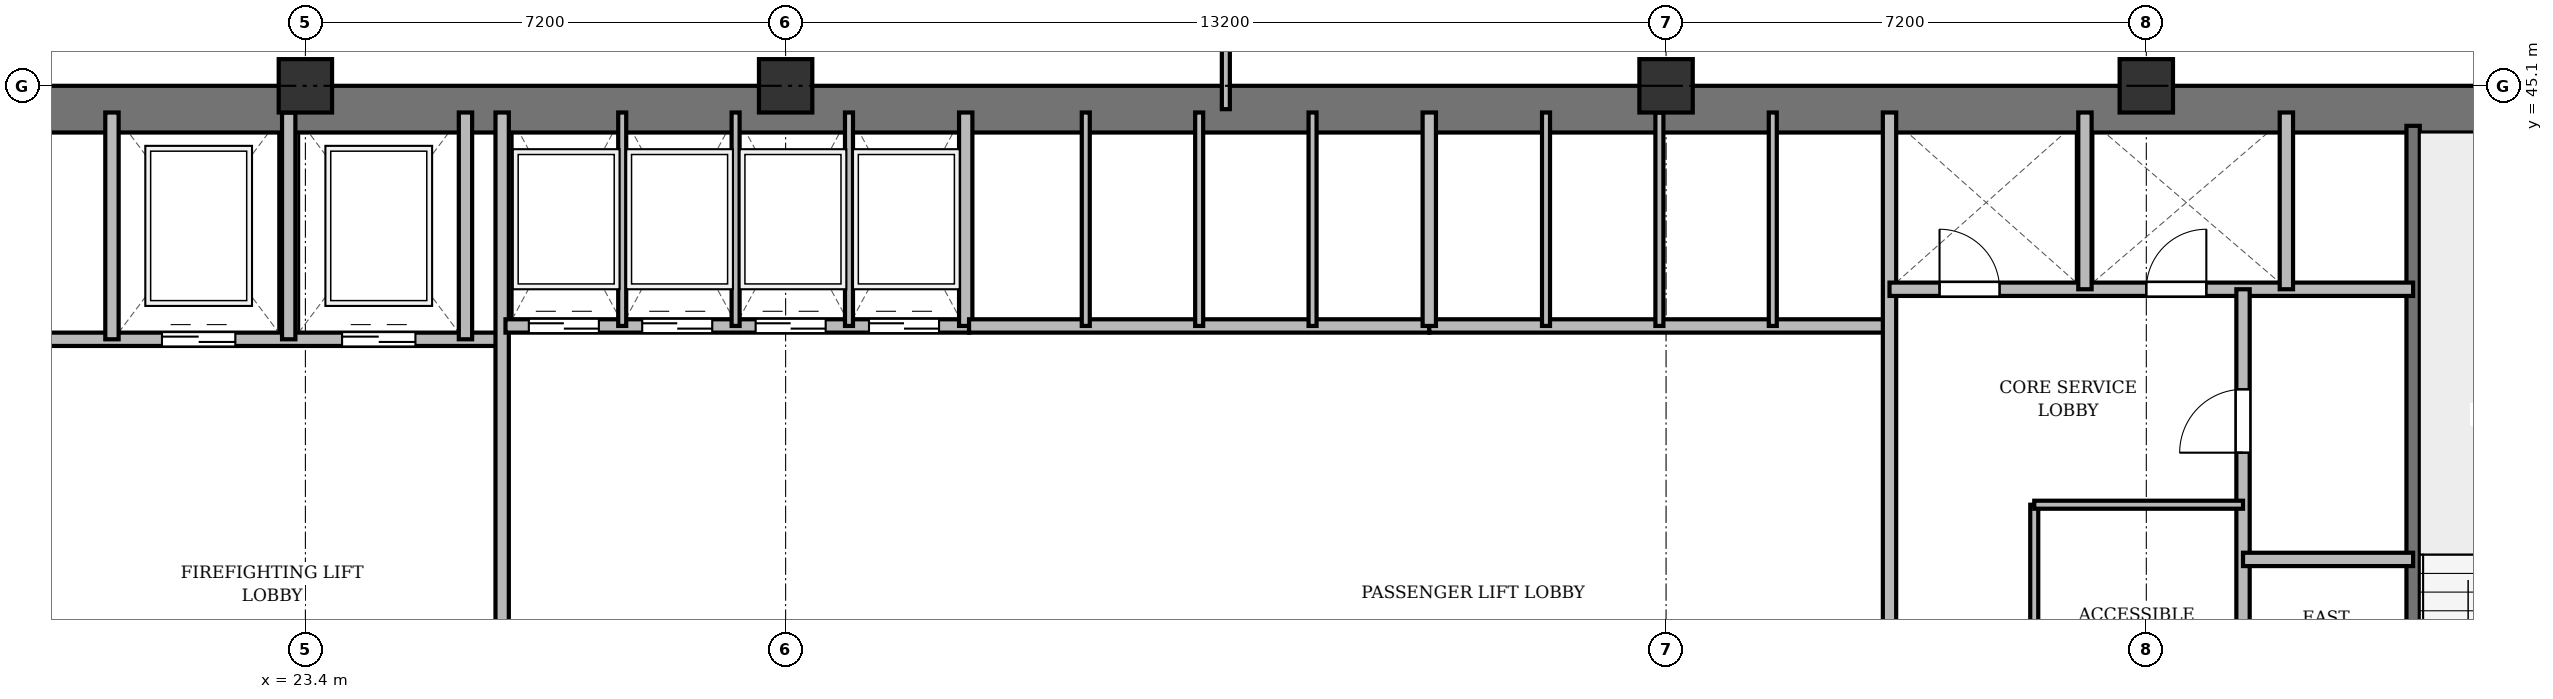
"""IFC4 building model, lengths in metres.
Left out: names, types, materials, properties, quantities, classifications, styles, units other than length and angle.
Written with IfcOpenShell. Run it as: python <this file> out.ifc"""

import sys

from ifc_helpers import new_model, si_unit, direction, frame, frame_2d, origin, origin_2d, place, context, subcontext, project, spatial, rectangle, extrude, source, transform, mapped, element, fill, save


model = new_model("IFC4")
c1 = context("Model", 3, precision=1e-05, world=origin(), true_north=direction((0.0, 1.0)))
c2 = subcontext(c1, "Body", "Model", "MODEL_VIEW")
j1 = project(units=[si_unit("LENGTHUNIT", "METRE"), si_unit("PLANEANGLEUNIT", "RADIAN")], contexts=[c1])
p1 = place(None, origin())
s1 = spatial("IfcSite", under=j1, at=p1, CompositionType="ELEMENT")
p2 = place(p1, origin())
s2 = spatial("IfcBuilding", under=s1, at=p2, CompositionType="ELEMENT")
p3 = place(p2, frame((0.0, 0.0, 88.9)))
s3 = spatial("IfcBuildingStorey", under=s2, at=p3, CompositionType="ELEMENT", Elevation=88.9)
m1 = source(origin(), c2, "Body", "SweptSolid", [
    extrude(rectangle(XDim=0.8, YDim=0.8, at=origin_2d()), origin(), (0.0, 0.0, 1.0), 3.6),
])
for number, where, z_axis, x_axis in (
    (1, (23.4, 45.1, 0.0), (0.0, 0.0, 1.0), (1.0, 0.0, 0.0)),
    (2, (30.6, 45.1, 0.0), (0.0, 0.0, 1.0), (1.0, 0.0, 0.0)),
    (3, (43.8, 45.1, 0.0), (0.0, 0.0, 1.0), (1.0, 0.0, 0.0)),
    (4, (51.0, 45.1, 0.0), (0.0, 0.0, 1.0), (1.0, 0.0, 0.0)),
):
    element("IfcColumn", number, at=place(p3, frame(where, z_axis=z_axis, x_axis=x_axis)), inside=s3, PredefinedType="COLUMN", context=c2, shape_type="MappedRepresentation", body=[
        mapped(m1, transform((0.0, 0.0, 0.0), x_axis=(1.0, 0.0, 0.0), y_axis=(0.0, 1.0, 0.0), z_axis=(0.0, 0.0, 1.0), scale=1.0)),
    ])
p4 = place(p3, frame((15.5, 44.75, 0.0), z_axis=(0.0, 0.0, 1.0), x_axis=(1.0, 0.0, 0.0)))
e5 = element("IfcWall", 5, at=p4, inside=s3, PredefinedType="SHEAR", context=c2, shape_type="SweptSolid", body=[
    extrude(rectangle(XDim=43.4, YDim=0.7, at=frame_2d((21.7, 0.0))), origin(), (0.0, 0.0, 1.0), 3.34),
])
p5 = place(p3, frame((55.0, 33.4, 0.0), z_axis=(0.0, 0.0, 1.0), x_axis=(0.0, 1.0, 0.0)))
e6 = element("IfcWall", 6, at=p5, inside=s3, PredefinedType="SHEAR", context=c2, shape_type="SweptSolid", body=[
    extrude(rectangle(XDim=11.1, YDim=0.2, at=frame_2d((5.55, 0.0))), origin(), (0.0, 0.0, 1.0), 3.34),
])
p6 = place(p5, frame((0.85, 0.0, 0.0)))
e7 = element("IfcOpeningElement", 7, at=p6, cuts=e6, PredefinedType="OPENING", context=c2, shape_type="SweptSolid", body=[
    extrude(rectangle(XDim=1.1, YDim=2.15, at=frame_2d((0.55, 1.075))), frame((0.0, 0.11, 0.0), z_axis=(0.0, -1.0, 0.0), x_axis=(1.0, 0.0, 0.0)), (0.0, 0.0, 1.0), 0.22),
])
p7 = place(p3, frame((19.55, 41.3, 0.0), z_axis=(0.0, 0.0, 1.0), x_axis=(1.0, 0.0, 0.0)))
e8 = element("IfcWall", 8, at=p7, inside=s3, PredefinedType="SOLIDWALL", context=c2, shape_type="SweptSolid", body=[
    extrude(rectangle(XDim=6.75, YDim=0.2, at=frame_2d((3.375, 0.0))), origin(), (0.0, 0.0, 1.0), 3.34),
])
p8 = place(p7, frame((1.7, 0.0, 0.0)))
e9 = element("IfcOpeningElement", 9, at=p8, cuts=e8, PredefinedType="OPENING", context=c2, shape_type="SweptSolid", body=[
    extrude(rectangle(XDim=1.1, YDim=2.15, at=frame_2d((0.55, 1.075))), frame((0.0, 0.11, 0.0), z_axis=(0.0, -1.0, 0.0), x_axis=(1.0, 0.0, 0.0)), (0.0, 0.0, 1.0), 0.22),
])
p9 = place(p7, frame((4.4, 0.0, 0.0)))
e10 = element("IfcOpeningElement", 10, at=p9, cuts=e8, PredefinedType="OPENING", context=c2, shape_type="SweptSolid", body=[
    extrude(rectangle(XDim=1.1, YDim=2.15, at=frame_2d((0.55, 1.075))), frame((0.0, 0.11, 0.0), z_axis=(0.0, -1.0, 0.0), x_axis=(1.0, 0.0, 0.0)), (0.0, 0.0, 1.0), 0.22),
])
for number, where, z_axis, x_axis in (
    (11, (20.5, 41.3, 0.0), (0.0, 0.0, 1.0), (0.0, 1.0, 0.0)),
    (12, (23.15, 41.3, 0.0), (0.0, 0.0, 1.0), (0.0, 1.0, 0.0)),
    (13, (25.8, 41.3, 0.0), (0.0, 0.0, 1.0), (0.0, 1.0, 0.0)),
):
    element("IfcWall", number, at=place(p3, frame(where, z_axis=z_axis, x_axis=x_axis)), inside=s3, PredefinedType="SOLIDWALL", context=c2, shape_type="SweptSolid", body=[
        extrude(rectangle(XDim=3.4, YDim=0.2, at=frame_2d((1.7, 0.0))), origin(), (0.0, 0.0, 1.0), 3.34),
    ])
p10 = place(p3, frame((26.35, 33.4, 0.0), z_axis=(0.0, 0.0, 1.0), x_axis=(0.0, 1.0, 0.0)))
e14 = element("IfcWall", 14, at=p10, inside=s3, PredefinedType="SOLIDWALL", context=c2, shape_type="SweptSolid", body=[
    extrude(rectangle(XDim=11.3, YDim=0.2, at=frame_2d((5.65, 0.0))), origin(), (0.0, 0.0, 1.0), 2.752),
])
p11 = place(p3, frame((26.4, 41.5, 0.0), z_axis=(0.0, 0.0, 1.0), x_axis=(1.0, 0.0, 0.0)))
e15 = element("IfcWall", 15, at=p11, inside=s3, PredefinedType="SOLIDWALL", context=c2, shape_type="SweptSolid", body=[
    extrude(rectangle(XDim=6.95, YDim=0.2, at=frame_2d((3.475, 0.0))), origin(), (0.0, 0.0, 1.0), 3.34),
])
p12 = place(p11, frame((0.35, 0.0, 0.0)))
e16 = element("IfcOpeningElement", 16, at=p12, cuts=e15, PredefinedType="OPENING", context=c2, shape_type="SweptSolid", body=[
    extrude(rectangle(XDim=1.05, YDim=2.15, at=frame_2d((0.525, 1.075))), frame((0.0, 0.11, 0.0), z_axis=(0.0, -1.0, 0.0), x_axis=(1.0, 0.0, 0.0)), (0.0, 0.0, 1.0), 0.22),
])
p13 = place(p11, frame((2.05, 0.0, 0.0)))
e17 = element("IfcOpeningElement", 17, at=p13, cuts=e15, PredefinedType="OPENING", context=c2, shape_type="SweptSolid", body=[
    extrude(rectangle(XDim=1.05, YDim=2.15, at=frame_2d((0.525, 1.075))), frame((0.0, 0.11, 0.0), z_axis=(0.0, -1.0, 0.0), x_axis=(1.0, 0.0, 0.0)), (0.0, 0.0, 1.0), 0.22),
])
p14 = place(p11, frame((3.75, 0.0, 0.0)))
e18 = element("IfcOpeningElement", 18, at=p14, cuts=e15, PredefinedType="OPENING", context=c2, shape_type="SweptSolid", body=[
    extrude(rectangle(XDim=1.05, YDim=2.15, at=frame_2d((0.525, 1.075))), frame((0.0, 0.11, 0.0), z_axis=(0.0, -1.0, 0.0), x_axis=(1.0, 0.0, 0.0)), (0.0, 0.0, 1.0), 0.22),
])
p15 = place(p11, frame((5.45, 0.0, 0.0)))
e19 = element("IfcOpeningElement", 19, at=p15, cuts=e15, PredefinedType="OPENING", context=c2, shape_type="SweptSolid", body=[
    extrude(rectangle(XDim=1.05, YDim=2.15, at=frame_2d((0.525, 1.075))), frame((0.0, 0.11, 0.0), z_axis=(0.0, -1.0, 0.0), x_axis=(1.0, 0.0, 0.0)), (0.0, 0.0, 1.0), 0.22),
])
p16 = place(p3, frame((33.3, 41.5, 0.0), z_axis=(0.0, 0.0, 1.0), x_axis=(0.0, 1.0, 0.0)))
e20 = element("IfcWall", 20, at=p16, inside=s3, PredefinedType="SOLIDWALL", context=c2, shape_type="SweptSolid", body=[
    extrude(rectangle(XDim=3.2, YDim=0.2, at=frame_2d((1.6, 0.0))), origin(), (0.0, 0.0, 1.0), 3.34),
])
for number, where, z_axis, x_axis in (
    (21, (28.15, 41.5, 0.0), (0.0, 0.0, 1.0), (0.0, 1.0, 0.0)),
    (22, (29.85, 41.5, 0.0), (0.0, 0.0, 1.0), (0.0, 1.0, 0.0)),
    (23, (31.55, 41.5, 0.0), (0.0, 0.0, 1.0), (0.0, 1.0, 0.0)),
):
    element("IfcWall", number, at=place(p3, frame(where, z_axis=z_axis, x_axis=x_axis)), inside=s3, PredefinedType="PARTITIONING", context=c2, shape_type="SweptSolid", body=[
        extrude(rectangle(XDim=3.2, YDim=0.12, at=frame_2d((1.6, 0.0))), origin(), (0.0, 0.0, 1.0), 3.34),
    ])
p17 = place(p3, frame((33.35, 41.5, 0.0), z_axis=(0.0, 0.0, 1.0), x_axis=(1.0, 0.0, 0.0)))
e24 = element("IfcWall", 24, at=p17, inside=s3, PredefinedType="SOLIDWALL", context=c2, shape_type="SweptSolid", body=[
    extrude(rectangle(XDim=6.9, YDim=0.2, at=frame_2d((3.45, 0.0))), origin(), (0.0, 0.0, 1.0), 3.34),
])
for number, where, z_axis, x_axis in (
    (25, (35.1, 41.5, 0.0), (0.0, 0.0, 1.0), (0.0, 1.0, 0.0)),
    (26, (36.8, 41.5, 0.0), (0.0, 0.0, 1.0), (0.0, 1.0, 0.0)),
    (27, (38.5, 41.5, 0.0), (0.0, 0.0, 1.0), (0.0, 1.0, 0.0)),
):
    element("IfcWall", number, at=place(p3, frame(where, z_axis=z_axis, x_axis=x_axis)), inside=s3, PredefinedType="PARTITIONING", context=c2, shape_type="SweptSolid", body=[
        extrude(rectangle(XDim=3.2, YDim=0.12, at=frame_2d((1.6, 0.0))), origin(), (0.0, 0.0, 1.0), 3.34),
    ])
p18 = place(p3, frame((40.25, 41.5, 0.0), z_axis=(0.0, 0.0, 1.0), x_axis=(1.0, 0.0, 0.0)))
e28 = element("IfcWall", 28, at=p18, inside=s3, PredefinedType="SOLIDWALL", context=c2, shape_type="SweptSolid", body=[
    extrude(rectangle(XDim=6.9, YDim=0.2, at=frame_2d((3.45, 0.0))), origin(), (0.0, 0.0, 1.0), 2.84),
])
p19 = place(p3, frame((40.25, 41.5, 0.0), z_axis=(0.0, 0.0, 1.0), x_axis=(0.0, 1.0, 0.0)))
e29 = element("IfcWall", 29, at=p19, inside=s3, PredefinedType="SOLIDWALL", context=c2, shape_type="SweptSolid", body=[
    extrude(rectangle(XDim=3.2, YDim=0.2, at=frame_2d((1.6, 0.0))), origin(), (0.0, 0.0, 1.0), 3.34),
])
p20 = place(p3, frame((42.0, 41.5, 0.0), z_axis=(0.0, 0.0, 1.0), x_axis=(0.0, 1.0, 0.0)))
e30 = element("IfcWall", 30, at=p20, inside=s3, PredefinedType="PARTITIONING", context=c2, shape_type="SweptSolid", body=[
    extrude(rectangle(XDim=3.2, YDim=0.12, at=frame_2d((1.6, 0.0))), origin(), (0.0, 0.0, 1.0), 3.34),
])
p21 = place(p3, frame((43.7, 41.5, 0.0), z_axis=(0.0, 0.0, 1.0), x_axis=(0.0, 1.0, 0.0)))
e31 = element("IfcWall", 31, at=p21, inside=s3, PredefinedType="PARTITIONING", context=c2, shape_type="SweptSolid", body=[
    extrude(rectangle(XDim=3.2, YDim=0.12, at=frame_2d((1.6, 0.0))), origin(), (0.0, 0.0, 1.0), 2.84),
])
p22 = place(p3, frame((45.4, 41.5, 0.0), z_axis=(0.0, 0.0, 1.0), x_axis=(0.0, 1.0, 0.0)))
e32 = element("IfcWall", 32, at=p22, inside=s3, PredefinedType="PARTITIONING", context=c2, shape_type="SweptSolid", body=[
    extrude(rectangle(XDim=3.2, YDim=0.12, at=frame_2d((1.6, 0.0))), origin(), (0.0, 0.0, 1.0), 3.34),
])
p23 = place(p3, frame((47.15, 33.4, 0.0), z_axis=(0.0, 0.0, 1.0), x_axis=(0.0, 1.0, 0.0)))
e33 = element("IfcWall", 33, at=p23, inside=s3, PredefinedType="SOLIDWALL", context=c2, shape_type="SweptSolid", body=[
    extrude(rectangle(XDim=11.3, YDim=0.2, at=frame_2d((5.65, 0.0))), origin(), (0.0, 0.0, 1.0), 2.752),
])
p24 = place(p3, frame((47.15, 42.05, 0.0), z_axis=(0.0, 0.0, 1.0), x_axis=(1.0, 0.0, 0.0)))
e34 = element("IfcWall", 34, at=p24, inside=s3, PredefinedType="SOLIDWALL", context=c2, shape_type="SweptSolid", body=[
    extrude(rectangle(XDim=7.85, YDim=0.2, at=frame_2d((3.925, 0.0))), origin(), (0.0, 0.0, 1.0), 2.84),
])
p25 = place(p24, frame((0.75, 0.0, 0.0)))
e35 = element("IfcOpeningElement", 35, at=p25, cuts=e34, PredefinedType="OPENING", context=c2, shape_type="SweptSolid", body=[
    extrude(rectangle(XDim=0.9, YDim=2.1, at=frame_2d((0.45, 1.05))), frame((0.0, 0.11, 0.0), z_axis=(0.0, -1.0, 0.0), x_axis=(1.0, 0.0, 0.0)), (0.0, 0.0, 1.0), 0.22),
])
p26 = place(p24, frame((3.85, 0.0, 0.0)))
e36 = element("IfcOpeningElement", 36, at=p26, cuts=e34, PredefinedType="OPENING", context=c2, shape_type="SweptSolid", body=[
    extrude(rectangle(XDim=0.9, YDim=2.1, at=frame_2d((0.45, 1.05))), frame((0.0, 0.11, 0.0), z_axis=(0.0, -1.0, 0.0), x_axis=(1.0, 0.0, 0.0)), (0.0, 0.0, 1.0), 0.22),
])
for number, where, z_axis, x_axis in (
    (37, (50.08, 42.05, 0.0), (0.0, 0.0, 1.0), (0.0, 1.0, 0.0)),
    (38, (53.1, 42.05, 0.0), (0.0, 0.0, 1.0), (0.0, 1.0, 0.0)),
):
    element("IfcWall", number, at=place(p3, frame(where, z_axis=z_axis, x_axis=x_axis)), inside=s3, PredefinedType="SOLIDWALL", context=c2, shape_type="SweptSolid", body=[
        extrude(rectangle(XDim=2.65, YDim=0.2, at=frame_2d((1.325, 0.0))), origin(), (0.0, 0.0, 1.0), 3.34),
    ])
p27 = place(p3, frame((52.45, 33.4, 0.0), z_axis=(0.0, 0.0, 1.0), x_axis=(0.0, 1.0, 0.0)))
e39 = element("IfcWall", 39, at=p27, inside=s3, PredefinedType="PARTITIONING", context=c2, shape_type="SweptSolid", body=[
    extrude(rectangle(XDim=8.65, YDim=0.2, at=frame_2d((4.325, 0.0))), origin(), (0.0, 0.0, 1.0), 2.752),
])
p28 = place(p27, frame((6.2, 0.0, 0.0)))
e40 = element("IfcOpeningElement", 40, at=p28, cuts=e39, PredefinedType="OPENING", context=c2, shape_type="SweptSolid", body=[
    extrude(rectangle(XDim=0.95, YDim=2.15, at=frame_2d((0.475, 1.075))), frame((0.0, 0.11, 0.0), z_axis=(0.0, -1.0, 0.0), x_axis=(1.0, 0.0, 0.0)), (0.0, 0.0, 1.0), 0.22),
])
p29 = place(p3, frame((52.45, 38.0, 0.0), z_axis=(0.0, 0.0, 1.0), x_axis=(1.0, 0.0, 0.0)))
e41 = element("IfcWall", 41, at=p29, inside=s3, PredefinedType="PARTITIONING", context=c2, shape_type="SweptSolid", body=[
    extrude(rectangle(XDim=2.55, YDim=0.2, at=frame_2d((1.275, 0.0))), origin(), (0.0, 0.0, 1.0), 3.34),
])
p30 = place(p3, frame((49.32, 33.4, 0.0), z_axis=(0.0, 0.0, 1.0), x_axis=(0.0, 1.0, 0.0)))
e42 = element("IfcWall", 42, at=p30, inside=s3, PredefinedType="PARTITIONING", context=c2, shape_type="SweptSolid", body=[
    extrude(rectangle(XDim=5.42, YDim=0.12, at=frame_2d((2.71, 0.0))), origin(), (0.0, 0.0, 1.0), 2.752),
])
p31 = place(p30, frame((1.6, 0.0, 0.0)))
e43 = element("IfcOpeningElement", 43, at=p31, cuts=e42, PredefinedType="OPENING", context=c2, shape_type="SweptSolid", body=[
    extrude(rectangle(XDim=0.95, YDim=2.15, at=frame_2d((0.475, 1.075))), frame((0.0, 0.07, 0.0), z_axis=(0.0, -1.0, 0.0), x_axis=(1.0, 0.0, 0.0)), (0.0, 0.0, 1.0), 0.14),
])
p32 = place(p3, frame((49.32, 38.82, 0.0), z_axis=(0.0, 0.0, 1.0), x_axis=(1.0, 0.0, 0.0)))
e44 = element("IfcWall", 44, at=p32, inside=s3, PredefinedType="PARTITIONING", context=c2, shape_type="SweptSolid", body=[
    extrude(rectangle(XDim=3.13, YDim=0.12, at=frame_2d((1.565, 0.0))), origin(), (0.0, 0.0, 1.0), 2.84),
])
p33 = place(p3, frame((37.2, 44.75, 0.0), z_axis=(0.0, 0.0, 1.0), x_axis=(0.0, 1.0, 0.0)))
e45 = element("IfcWall", 45, at=p33, inside=s3, PredefinedType="PARTITIONING", context=c2, shape_type="SweptSolid", body=[
    extrude(rectangle(XDim=3.61, YDim=0.12, at=frame_2d((1.805, 0.0))), origin(), (0.0, 0.0, 1.0), 2.752),
])
p34 = place(p33, frame((1.1, 0.0, 0.0)))
e46 = element("IfcOpeningElement", 46, at=p34, cuts=e45, PredefinedType="OPENING", context=c2, shape_type="SweptSolid", body=[
    extrude(rectangle(XDim=0.95, YDim=2.15, at=frame_2d((0.475, 1.075))), frame((0.0, 0.07, 0.0), z_axis=(0.0, -1.0, 0.0), x_axis=(1.0, 0.0, 0.0)), (0.0, 0.0, 1.0), 0.14),
])
m2 = source(origin(), c2, "Body", "SweptSolid", [
    extrude(rectangle(XDim=1.1, YDim=2.15, at=frame_2d((0.55, 1.075))), frame((0.0, 0.025, 0.0), z_axis=(0.0, -1.0, 0.0), x_axis=(1.0, 0.0, 0.0)), (0.0, 0.0, 1.0), 0.05),
])
p35 = place(p8, origin())
e47 = element("IfcDoor", 47, at=p35, inside=s3, OperationType="DOUBLE_DOOR_SLIDING", PredefinedType="DOOR", context=c2, shape_type="MappedRepresentation", body=[
    mapped(m2, transform((0.0, 0.0, 0.0), x_axis=(1.0, 0.0, 0.0), y_axis=(0.0, 1.0, 0.0), z_axis=(0.0, 0.0, 1.0), scale=1.0)),
])
fill(e9, e47)
p36 = place(p9, origin())
e48 = element("IfcDoor", 48, at=p36, inside=s3, OperationType="DOUBLE_DOOR_SLIDING", PredefinedType="DOOR", context=c2, shape_type="MappedRepresentation", body=[
    mapped(m2, transform((0.0, 0.0, 0.0), x_axis=(1.0, 0.0, 0.0), y_axis=(0.0, 1.0, 0.0), z_axis=(0.0, 0.0, 1.0), scale=1.0)),
])
fill(e10, e48)
m3 = source(origin(), c2, "Body", "SweptSolid", [
    extrude(rectangle(XDim=1.05, YDim=2.15, at=frame_2d((0.525, 1.075))), frame((0.0, 0.025, 0.0), z_axis=(0.0, -1.0, 0.0), x_axis=(1.0, 0.0, 0.0)), (0.0, 0.0, 1.0), 0.05),
])
p37 = place(p12, origin())
e49 = element("IfcDoor", 49, at=p37, inside=s3, OperationType="DOUBLE_DOOR_SLIDING", PredefinedType="DOOR", context=c2, shape_type="MappedRepresentation", body=[
    mapped(m3, transform((0.0, 0.0, 0.0), x_axis=(1.0, 0.0, 0.0), y_axis=(0.0, 1.0, 0.0), z_axis=(0.0, 0.0, 1.0), scale=1.0)),
])
fill(e16, e49)
p38 = place(p13, origin())
e50 = element("IfcDoor", 50, at=p38, inside=s3, OperationType="DOUBLE_DOOR_SLIDING", PredefinedType="DOOR", context=c2, shape_type="MappedRepresentation", body=[
    mapped(m3, transform((0.0, 0.0, 0.0), x_axis=(1.0, 0.0, 0.0), y_axis=(0.0, 1.0, 0.0), z_axis=(0.0, 0.0, 1.0), scale=1.0)),
])
fill(e17, e50)
p39 = place(p14, origin())
e51 = element("IfcDoor", 51, at=p39, inside=s3, OperationType="DOUBLE_DOOR_SLIDING", PredefinedType="DOOR", context=c2, shape_type="MappedRepresentation", body=[
    mapped(m3, transform((0.0, 0.0, 0.0), x_axis=(1.0, 0.0, 0.0), y_axis=(0.0, 1.0, 0.0), z_axis=(0.0, 0.0, 1.0), scale=1.0)),
])
fill(e18, e51)
p40 = place(p15, origin())
e52 = element("IfcDoor", 52, at=p40, inside=s3, OperationType="DOUBLE_DOOR_SLIDING", PredefinedType="DOOR", context=c2, shape_type="MappedRepresentation", body=[
    mapped(m3, transform((0.0, 0.0, 0.0), x_axis=(1.0, 0.0, 0.0), y_axis=(0.0, 1.0, 0.0), z_axis=(0.0, 0.0, 1.0), scale=1.0)),
])
fill(e19, e52)
m4 = source(origin(), c2, "Body", "SweptSolid", [
    extrude(rectangle(XDim=0.9, YDim=2.1, at=frame_2d((0.45, 1.05))), frame((0.0, 0.025, 0.0), z_axis=(0.0, -1.0, 0.0), x_axis=(1.0, 0.0, 0.0)), (0.0, 0.0, 1.0), 0.05),
])
p41 = place(p25, origin())
e53 = element("IfcDoor", 53, at=p41, inside=s3, OperationType="SINGLE_SWING_LEFT", PredefinedType="DOOR", context=c2, shape_type="MappedRepresentation", body=[
    mapped(m4, transform((0.0, 0.0, 0.0), x_axis=(1.0, 0.0, 0.0), y_axis=(0.0, 1.0, 0.0), z_axis=(0.0, 0.0, 1.0), scale=1.0)),
])
fill(e35, e53)
p42 = place(p26, origin())
e54 = element("IfcDoor", 54, at=p42, inside=s3, OperationType="SINGLE_SWING_RIGHT", PredefinedType="DOOR", context=c2, shape_type="MappedRepresentation", body=[
    mapped(m4, transform((0.0, 0.0, 0.0), x_axis=(1.0, 0.0, 0.0), y_axis=(0.0, 1.0, 0.0), z_axis=(0.0, 0.0, 1.0), scale=1.0)),
])
fill(e36, e54)
m5 = source(origin(), c2, "Body", "SweptSolid", [
    extrude(rectangle(XDim=0.95, YDim=2.15, at=frame_2d((0.475, 1.075))), frame((0.0, 0.025, 0.0), z_axis=(0.0, -1.0, 0.0), x_axis=(1.0, 0.0, 0.0)), (0.0, 0.0, 1.0), 0.05),
])
p43 = place(p28, origin())
e55 = element("IfcDoor", 55, at=p43, inside=s3, OperationType="SINGLE_SWING_LEFT", PredefinedType="DOOR", context=c2, shape_type="MappedRepresentation", body=[
    mapped(m5, transform((0.0, 0.0, 0.0), x_axis=(1.0, 0.0, 0.0), y_axis=(0.0, 1.0, 0.0), z_axis=(0.0, 0.0, 1.0), scale=1.0)),
])
fill(e40, e55)
save(model, sys.argv[1])
